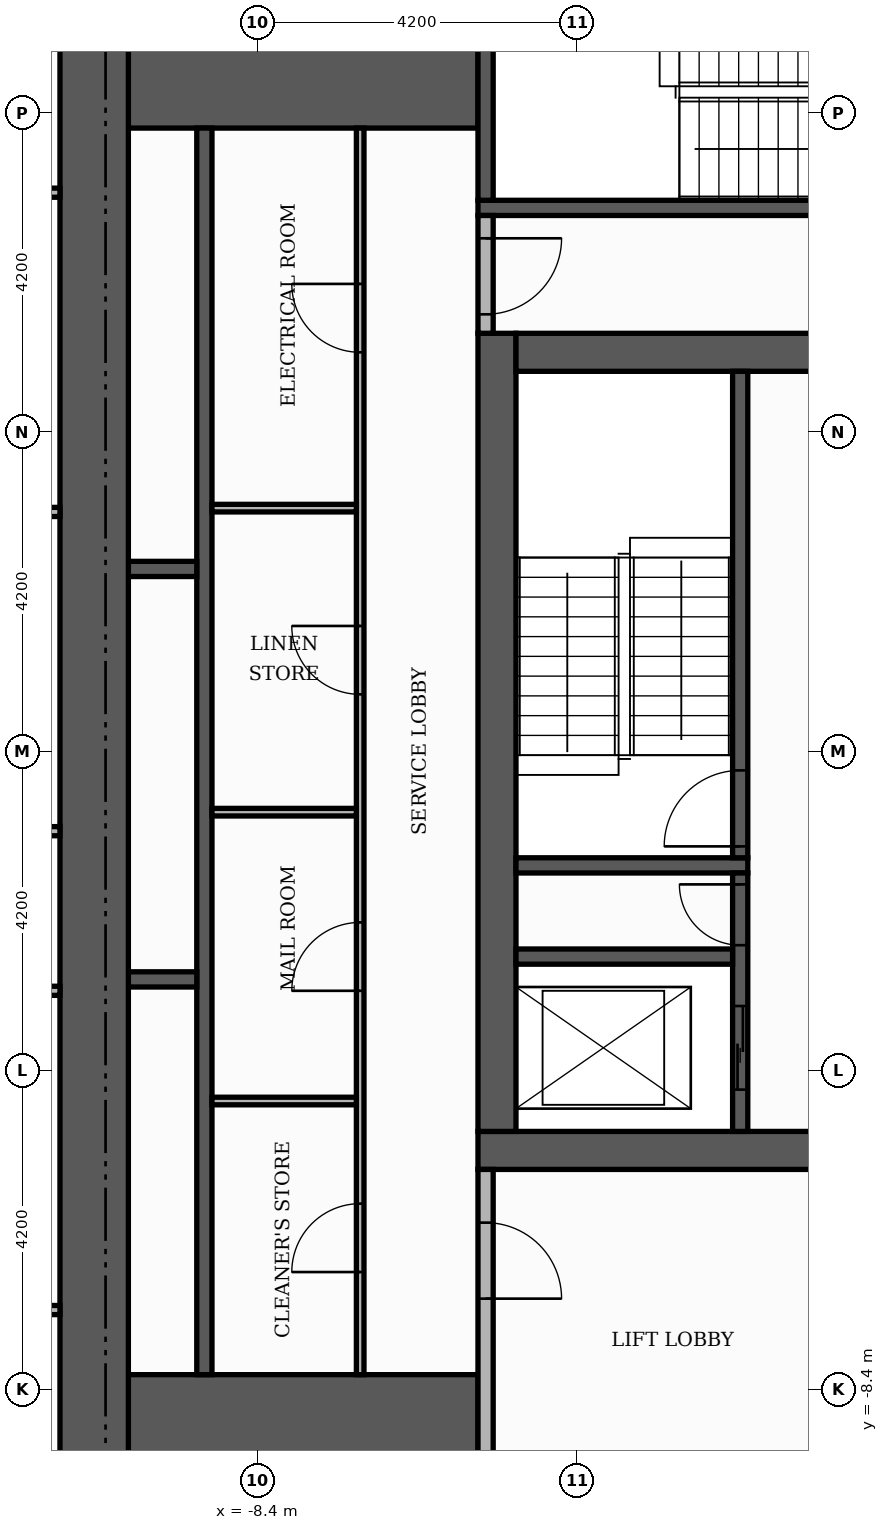
"""IFC4 building model, lengths in metres.
Left out: names, types, materials, properties, quantities, classifications, styles, units other than length and angle.
Written with IfcOpenShell. Run it as: python <this file> out.ifc"""

import sys

from ifc_helpers import new_model, si_unit, direction, frame, frame_2d, origin, place, context, subcontext, project, spatial, rectangle, extrude, element, fill, save


model = new_model("IFC4")
c1 = context("Model", 3, precision=1e-05, world=origin(), true_north=direction((0.0, 1.0)))
c2 = subcontext(c1, "Body", "Model", "MODEL_VIEW")
j1 = project(units=[si_unit("LENGTHUNIT", "METRE"), si_unit("PLANEANGLEUNIT", "RADIAN")], contexts=[c1])
p1 = place(None, origin())
s1 = spatial("IfcSite", under=j1, at=p1, CompositionType="ELEMENT")
p2 = place(p1, origin())
s2 = spatial("IfcBuilding", under=s1, at=p2, CompositionType="ELEMENT")
p3 = place(p2, frame((0.0, 0.0, 157.2)))
s3 = spatial("IfcBuildingStorey", under=s2, at=p3, CompositionType="ELEMENT", Elevation=157.2)
p4 = place(p3, frame((-5.5, -5.25, 0.0), z_axis=(0.0, 0.0, 1.0), x_axis=(1.0, 0.0, 0.0)))
e1 = element("IfcWall", 1, at=p4, inside=s3, PredefinedType="SHEAR", context=c2, shape_type="SweptSolid", body=[
    extrude(rectangle(XDim=11.0, YDim=0.5, at=frame_2d((5.5, 0.0))), origin(), (0.0, 0.0, 1.0), 3.48),
])
p5 = place(p4, frame((4.9, 0.0, 0.0)))
e2 = element("IfcOpeningElement", 2, at=p5, cuts=e1, PredefinedType="OPENING", context=c2, shape_type="SweptSolid", body=[
    extrude(rectangle(XDim=1.2, YDim=2.1, at=frame_2d((0.6, 1.05))), frame((0.0, 0.26, 0.0), z_axis=(0.0, -1.0, 0.0), x_axis=(1.0, 0.0, 0.0)), (0.0, 0.0, 1.0), 0.52),
])
p6 = place(p3, frame((-5.25, -5.0, 0.0), z_axis=(0.0, 0.0, 1.0), x_axis=(0.0, 1.0, 0.0)))
e3 = element("IfcWall", 3, at=p6, inside=s3, PredefinedType="SHEAR", context=c2, shape_type="SweptSolid", body=[
    extrude(rectangle(XDim=10.5, YDim=0.5, at=frame_2d((5.25, 0.0))), origin(), (0.0, 0.0, 1.0), 3.48),
])
p7 = place(p3, frame((-5.0, 5.25, 0.0), z_axis=(0.0, 0.0, 1.0), x_axis=(1.0, 0.0, 0.0)))
e4 = element("IfcWall", 4, at=p7, inside=s3, PredefinedType="SHEAR", context=c2, shape_type="SweptSolid", body=[
    extrude(rectangle(XDim=10.0, YDim=0.5, at=frame_2d((5.0, 0.0))), origin(), (0.0, 0.0, 1.0), 3.48),
])
p8 = place(p7, frame((4.4, 0.0, 0.0)))
e5 = element("IfcOpeningElement", 5, at=p8, cuts=e4, PredefinedType="OPENING", context=c2, shape_type="SweptSolid", body=[
    extrude(rectangle(XDim=1.2, YDim=2.1, at=frame_2d((0.6, 1.05))), frame((0.0, 0.26, 0.0), z_axis=(0.0, -1.0, 0.0), x_axis=(1.0, 0.0, 0.0)), (0.0, 0.0, 1.0), 0.52),
])
for number, where, z_axis, x_axis in (
    (6, (-10.1, -9.15, 0.0), (0.0, 0.0, 1.0), (1.0, 0.0, 0.0)),
    (7, (-10.1, 9.15, 0.0), (0.0, 0.0, 1.0), (1.0, 0.0, 0.0)),
):
    element("IfcWall", number, at=place(p3, frame(where, z_axis=z_axis, x_axis=x_axis)), inside=s3, PredefinedType="SHEAR", context=c2, shape_type="SweptSolid", body=[
        extrude(rectangle(XDim=4.6, YDim=1.9, at=frame_2d((2.3, 0.0))), origin(), (0.0, 0.0, 1.0), 3.48),
    ])
p9 = place(p3, frame((-5.0, -1.5, 0.0), z_axis=(0.0, 0.0, 1.0), x_axis=(1.0, 0.0, 0.0)))
e8 = element("IfcWall", 8, at=p9, inside=s3, PredefinedType="SHEAR", context=c2, shape_type="SweptSolid", body=[
    extrude(rectangle(XDim=3.05, YDim=0.2, at=frame_2d((1.525, 0.0))), origin(), (0.0, 0.0, 1.0), 3.48),
])
p10 = place(p3, frame((-2.05, -1.4, 0.0), z_axis=(0.0, 0.0, 1.0), x_axis=(0.0, 1.0, 0.0)))
e9 = element("IfcWall", 9, at=p10, inside=s3, PredefinedType="SHEAR", context=c2, shape_type="SweptSolid", body=[
    extrude(rectangle(XDim=6.4, YDim=0.2, at=frame_2d((3.2, 0.0))), origin(), (0.0, 0.0, 1.0), 3.48),
])
p11 = place(p10, frame((0.15, 0.0, 0.0)))
e10 = element("IfcOpeningElement", 10, at=p11, cuts=e9, PredefinedType="OPENING", context=c2, shape_type="SweptSolid", body=[
    extrude(rectangle(XDim=1.0, YDim=2.1, at=frame_2d((0.5, 1.05))), frame((0.0, 0.11, 0.0), z_axis=(0.0, -1.0, 0.0), x_axis=(1.0, 0.0, 0.0)), (0.0, 0.0, 1.0), 0.22),
])
p12 = place(p3, frame((-5.5, 7.15, 0.0), z_axis=(0.0, 0.0, 1.0), x_axis=(1.0, 0.0, 0.0)))
e11 = element("IfcWall", 11, at=p12, inside=s3, PredefinedType="SHEAR", context=c2, shape_type="SweptSolid", body=[
    extrude(rectangle(XDim=6.8, YDim=0.2, at=frame_2d((3.4, 0.0))), origin(), (0.0, 0.0, 1.0), 3.48),
])
p13 = place(p3, frame((-5.4, 7.25, 0.0), z_axis=(0.0, 0.0, 1.0), x_axis=(0.0, 1.0, 0.0)))
e12 = element("IfcWall", 12, at=p13, inside=s3, PredefinedType="SHEAR", context=c2, shape_type="SweptSolid", body=[
    extrude(rectangle(XDim=2.85, YDim=0.2, at=frame_2d((1.425, 0.0))), origin(), (0.0, 0.0, 1.0), 3.48),
])
p14 = place(p3, frame((-9.1, -8.2, 0.0), z_axis=(0.0, 0.0, 1.0), x_axis=(0.0, 1.0, 0.0)))
e13 = element("IfcWall", 13, at=p14, inside=s3, PredefinedType="SHEAR", context=c2, shape_type="SweptSolid", body=[
    extrude(rectangle(XDim=16.4, YDim=0.2, at=frame_2d((8.2, 0.0))), origin(), (0.0, 0.0, 1.0), 3.48),
])
p15 = place(p3, frame((-2.05, -5.0, 0.0), z_axis=(0.0, 0.0, 1.0), x_axis=(0.0, 1.0, 0.0)))
e14 = element("IfcWall", 14, at=p15, inside=s3, PredefinedType="SHEAR", context=c2, shape_type="SweptSolid", body=[
    extrude(rectangle(XDim=3.4, YDim=0.2, at=frame_2d((1.7, 0.0))), origin(), (0.0, 0.0, 1.0), 3.48),
])
p16 = place(p15, frame((0.55, 0.0, 0.0)))
e15 = element("IfcOpeningElement", 15, at=p16, cuts=e14, PredefinedType="OPENING", context=c2, shape_type="SweptSolid", body=[
    extrude(rectangle(XDim=1.1, YDim=2.1, at=frame_2d((0.55, 1.05))), frame((0.0, 0.11, 0.0), z_axis=(0.0, -1.0, 0.0), x_axis=(1.0, 0.0, 0.0)), (0.0, 0.0, 1.0), 0.22),
])
p17 = place(p15, frame((2.45, 0.0, 0.0)))
e16 = element("IfcOpeningElement", 16, at=p17, cuts=e14, PredefinedType="OPENING", context=c2, shape_type="SweptSolid", body=[
    extrude(rectangle(XDim=0.8, YDim=2.1, at=frame_2d((0.4, 1.05))), frame((0.0, 0.11, 0.0), z_axis=(0.0, -1.0, 0.0), x_axis=(1.0, 0.0, 0.0)), (0.0, 0.0, 1.0), 0.22),
])
p18 = place(p3, frame((-10.1, -3.0, 0.0), z_axis=(0.0, 0.0, 1.0), x_axis=(1.0, 0.0, 0.0)))
e17 = element("IfcWall", 17, at=p18, inside=s3, PredefinedType="SHEAR", context=c2, shape_type="SweptSolid", body=[
    extrude(rectangle(XDim=0.9, YDim=0.2, at=frame_2d((0.45, 0.0))), origin(), (0.0, 0.0, 1.0), 3.48),
])
p19 = place(p3, frame((-5.0, -2.7, 0.0), z_axis=(0.0, 0.0, 1.0), x_axis=(1.0, 0.0, 0.0)))
e18 = element("IfcWall", 18, at=p19, inside=s3, PredefinedType="SHEAR", context=c2, shape_type="SweptSolid", body=[
    extrude(rectangle(XDim=2.85, YDim=0.2, at=frame_2d((1.425, 0.0))), origin(), (0.0, 0.0, 1.0), 3.48),
])
p20 = place(p3, frame((-10.1, 2.4, 0.0), z_axis=(0.0, 0.0, 1.0), x_axis=(1.0, 0.0, 0.0)))
e19 = element("IfcWall", 19, at=p20, inside=s3, PredefinedType="SHEAR", context=c2, shape_type="SweptSolid", body=[
    extrude(rectangle(XDim=0.9, YDim=0.2, at=frame_2d((0.45, 0.0))), origin(), (0.0, 0.0, 1.0), 3.48),
])
p21 = place(p3, frame((-10.55, -10.1, 0.0), z_axis=(0.0, 0.0, 1.0), x_axis=(0.0, 1.0, 0.0)))
e20 = element("IfcWall", 20, at=p21, inside=s3, PredefinedType="SHEAR", context=c2, shape_type="SweptSolid", body=[
    extrude(rectangle(XDim=20.2, YDim=0.9, at=frame_2d((10.1, 0.0))), origin(), (0.0, 0.0, 1.0), 3.48),
])
p22 = place(p3, frame((-5.4, -10.1, 0.0), z_axis=(0.0, 0.0, 1.0), x_axis=(0.0, 1.0, 0.0)))
e21 = element("IfcWall", 21, at=p22, inside=s3, PredefinedType="PARTITIONING", context=c2, shape_type="SweptSolid", body=[
    extrude(rectangle(XDim=4.6, YDim=0.2, at=frame_2d((2.3, 0.0))), origin(), (0.0, 0.0, 1.0), 3.48),
])
p23 = place(p22, frame((2.9, 0.0, 0.0)))
e22 = element("IfcOpeningElement", 22, at=p23, cuts=e21, PredefinedType="OPENING", context=c2, shape_type="SweptSolid", body=[
    extrude(rectangle(XDim=1.0, YDim=2.1, at=frame_2d((0.5, 1.05))), frame((0.0, 0.11, 0.0), z_axis=(0.0, -1.0, 0.0), x_axis=(1.0, 0.0, 0.0)), (0.0, 0.0, 1.0), 0.22),
])
p24 = place(p3, frame((-7.05, -8.2, 0.0), z_axis=(0.0, 0.0, 1.0), x_axis=(0.0, 1.0, 0.0)))
e23 = element("IfcWall", 23, at=p24, inside=s3, PredefinedType="PARTITIONING", context=c2, shape_type="SweptSolid", body=[
    extrude(rectangle(XDim=16.4, YDim=0.1, at=frame_2d((8.2, 0.0))), origin(), (0.0, 0.0, 1.0), 3.48),
])
p25 = place(p24, frame((1.35, 0.0, 0.0)))
e24 = element("IfcOpeningElement", 24, at=p25, cuts=e23, PredefinedType="OPENING", context=c2, shape_type="SweptSolid", body=[
    extrude(rectangle(XDim=0.9, YDim=2.1, at=frame_2d((0.45, 1.05))), frame((0.0, 0.06, 0.0), z_axis=(0.0, -1.0, 0.0), x_axis=(1.0, 0.0, 0.0)), (0.0, 0.0, 1.0), 0.12),
])
p26 = place(p24, frame((5.05, 0.0, 0.0)))
e25 = element("IfcOpeningElement", 25, at=p26, cuts=e23, PredefinedType="OPENING", context=c2, shape_type="SweptSolid", body=[
    extrude(rectangle(XDim=0.9, YDim=2.1, at=frame_2d((0.45, 1.05))), frame((0.0, 0.06, 0.0), z_axis=(0.0, -1.0, 0.0), x_axis=(1.0, 0.0, 0.0)), (0.0, 0.0, 1.0), 0.12),
])
p27 = place(p24, frame((8.95, 0.0, 0.0)))
e26 = element("IfcOpeningElement", 26, at=p27, cuts=e23, PredefinedType="OPENING", context=c2, shape_type="SweptSolid", body=[
    extrude(rectangle(XDim=0.9, YDim=2.1, at=frame_2d((0.45, 1.05))), frame((0.0, 0.06, 0.0), z_axis=(0.0, -1.0, 0.0), x_axis=(1.0, 0.0, 0.0)), (0.0, 0.0, 1.0), 0.12),
])
p28 = place(p24, frame((13.45, 0.0, 0.0)))
e27 = element("IfcOpeningElement", 27, at=p28, cuts=e23, PredefinedType="OPENING", context=c2, shape_type="SweptSolid", body=[
    extrude(rectangle(XDim=0.9, YDim=2.1, at=frame_2d((0.45, 1.05))), frame((0.0, 0.06, 0.0), z_axis=(0.0, -1.0, 0.0), x_axis=(1.0, 0.0, 0.0)), (0.0, 0.0, 1.0), 0.12),
])
for number, where, z_axis, x_axis in (
    (28, (-9.0, -4.6, 0.0), (0.0, 0.0, 1.0), (1.0, 0.0, 0.0)),
    (29, (-9.0, -0.8, 0.0), (0.0, 0.0, 1.0), (1.0, 0.0, 0.0)),
    (30, (-9.0, 3.2, 0.0), (0.0, 0.0, 1.0), (1.0, 0.0, 0.0)),
):
    element("IfcWall", number, at=place(p3, frame(where, z_axis=z_axis, x_axis=x_axis)), inside=s3, PredefinedType="PARTITIONING", context=c2, shape_type="SweptSolid", body=[
        extrude(rectangle(XDim=1.9, YDim=0.1, at=frame_2d((0.95, 0.0))), origin(), (0.0, 0.0, 1.0), 3.48),
    ])
p29 = place(p3, frame((-5.4, 5.5, 0.0), z_axis=(0.0, 0.0, 1.0), x_axis=(0.0, 1.0, 0.0)))
e31 = element("IfcWall", 31, at=p29, inside=s3, PredefinedType="PARTITIONING", context=c2, shape_type="SweptSolid", body=[
    extrude(rectangle(XDim=1.55, YDim=0.2, at=frame_2d((0.775, 0.0))), origin(), (0.0, 0.0, 1.0), 3.48),
])
p30 = place(p29, frame((0.25, 0.0, 0.0)))
e32 = element("IfcOpeningElement", 32, at=p30, cuts=e31, PredefinedType="OPENING", context=c2, shape_type="SweptSolid", body=[
    extrude(rectangle(XDim=1.0, YDim=2.1, at=frame_2d((0.5, 1.05))), frame((0.0, 0.11, 0.0), z_axis=(0.0, -1.0, 0.0), x_axis=(1.0, 0.0, 0.0)), (0.0, 0.0, 1.0), 0.22),
])
for number, where, z_axis, x_axis in (
    (33, (-18.32, -7.35, 0.0), (0.0, 0.0, 1.0), (1.0, 0.0, 0.0)),
    (34, (-18.32, -3.15, 0.0), (0.0, 0.0, 1.0), (1.0, 0.0, 0.0)),
    (35, (-18.32, -1.05, 0.0), (0.0, 0.0, 1.0), (1.0, 0.0, 0.0)),
    (36, (-18.32, 3.15, 0.0), (0.0, 0.0, 1.0), (1.0, 0.0, 0.0)),
):
    element("IfcWall", number, at=place(p3, frame(where, z_axis=z_axis, x_axis=x_axis)), inside=s3, PredefinedType="PARTITIONING", context=c2, shape_type="SweptSolid", body=[
        extrude(rectangle(XDim=7.32, YDim=0.12, at=frame_2d((3.66, 0.0))), origin(), (0.0, 0.0, 1.0), 3.48),
    ])
p31 = place(p3, frame((-18.32, 7.35, 0.0), z_axis=(0.0, 0.0, 1.0), x_axis=(1.0, 0.0, 0.0)))
e37 = element("IfcWall", 37, at=p31, inside=s3, PredefinedType="PARTITIONING", context=c2, shape_type="SweptSolid", body=[
    extrude(rectangle(XDim=7.32, YDim=0.12, at=frame_2d((3.66, 0.0))), origin(), (0.0, 0.0, 1.0), 3.48),
])
p32 = place(p31, frame((3.21, 0.0, 0.0)))
e38 = element("IfcOpeningElement", 38, at=p32, cuts=e37, PredefinedType="OPENING", context=c2, shape_type="SweptSolid", body=[
    extrude(rectangle(XDim=0.9, YDim=2.1, at=frame_2d((0.45, 1.05))), frame((0.0, 0.07, 0.0), z_axis=(0.0, -1.0, 0.0), x_axis=(1.0, 0.0, 0.0)), (0.0, 0.0, 1.0), 0.14),
])
p33 = place(p16, origin())
e39 = element("IfcDoor", 39, at=p33, inside=s3, OperationType="SLIDING_TO_LEFT", PredefinedType="DOOR", context=c2, shape_type="SweptSolid", body=[
    extrude(rectangle(XDim=1.1, YDim=2.1, at=frame_2d((0.55, 1.05))), frame((0.0, 0.025, 0.0), z_axis=(0.0, -1.0, 0.0), x_axis=(1.0, 0.0, 0.0)), (0.0, 0.0, 1.0), 0.05),
])
fill(e15, e39)
p34 = place(p11, origin())
e40 = element("IfcDoor", 40, at=p34, inside=s3, OperationType="SINGLE_SWING_LEFT", PredefinedType="DOOR", context=c2, shape_type="SweptSolid", body=[
    extrude(rectangle(XDim=1.0, YDim=2.1, at=frame_2d((0.5, 1.05))), frame((0.0, 0.025, 0.0), z_axis=(0.0, -1.0, 0.0), x_axis=(1.0, 0.0, 0.0)), (0.0, 0.0, 1.0), 0.05),
])
fill(e10, e40)
p35 = place(p17, origin())
e41 = element("IfcDoor", 41, at=p35, inside=s3, OperationType="SINGLE_SWING_RIGHT", PredefinedType="DOOR", context=c2, shape_type="SweptSolid", body=[
    extrude(rectangle(XDim=0.8, YDim=2.1, at=frame_2d((0.4, 1.05))), frame((0.0, 0.025, 0.0), z_axis=(0.0, -1.0, 0.0), x_axis=(1.0, 0.0, 0.0)), (0.0, 0.0, 1.0), 0.05),
])
fill(e16, e41)
p36 = place(p30, frame((1.0, 0.0, 0.0), z_axis=(0.0, 0.0, 1.0), x_axis=(-1.0, 0.0, 0.0)))
e42 = element("IfcDoor", 42, at=p36, inside=s3, OperationType="SINGLE_SWING_RIGHT", PredefinedType="DOOR", context=c2, shape_type="SweptSolid", body=[
    extrude(rectangle(XDim=1.0, YDim=2.1, at=frame_2d((0.5, 1.05))), frame((0.0, 0.025, 0.0), z_axis=(0.0, -1.0, 0.0), x_axis=(1.0, 0.0, 0.0)), (0.0, 0.0, 1.0), 0.05),
])
fill(e32, e42)
p37 = place(p23, frame((1.0, 0.0, 0.0), z_axis=(0.0, 0.0, 1.0), x_axis=(-1.0, 0.0, 0.0)))
e43 = element("IfcDoor", 43, at=p37, inside=s3, OperationType="SINGLE_SWING_LEFT", PredefinedType="DOOR", context=c2, shape_type="SweptSolid", body=[
    extrude(rectangle(XDim=1.0, YDim=2.1, at=frame_2d((0.5, 1.05))), frame((0.0, 0.025, 0.0), z_axis=(0.0, -1.0, 0.0), x_axis=(1.0, 0.0, 0.0)), (0.0, 0.0, 1.0), 0.05),
])
fill(e22, e43)
p38 = place(p25, origin())
e44 = element("IfcDoor", 44, at=p38, inside=s3, OperationType="SINGLE_SWING_LEFT", PredefinedType="DOOR", context=c2, shape_type="SweptSolid", body=[
    extrude(rectangle(XDim=0.9, YDim=2.1, at=frame_2d((0.45, 1.05))), frame((0.0, 0.025, 0.0), z_axis=(0.0, -1.0, 0.0), x_axis=(1.0, 0.0, 0.0)), (0.0, 0.0, 1.0), 0.05),
])
fill(e24, e44)
p39 = place(p26, origin())
e45 = element("IfcDoor", 45, at=p39, inside=s3, OperationType="SINGLE_SWING_LEFT", PredefinedType="DOOR", context=c2, shape_type="SweptSolid", body=[
    extrude(rectangle(XDim=0.9, YDim=2.1, at=frame_2d((0.45, 1.05))), frame((0.0, 0.025, 0.0), z_axis=(0.0, -1.0, 0.0), x_axis=(1.0, 0.0, 0.0)), (0.0, 0.0, 1.0), 0.05),
])
fill(e25, e45)
p40 = place(p27, origin())
e46 = element("IfcDoor", 46, at=p40, inside=s3, OperationType="SINGLE_SWING_RIGHT", PredefinedType="DOOR", context=c2, shape_type="SweptSolid", body=[
    extrude(rectangle(XDim=0.9, YDim=2.1, at=frame_2d((0.45, 1.05))), frame((0.0, 0.025, 0.0), z_axis=(0.0, -1.0, 0.0), x_axis=(1.0, 0.0, 0.0)), (0.0, 0.0, 1.0), 0.05),
])
fill(e26, e46)
p41 = place(p28, origin())
e47 = element("IfcDoor", 47, at=p41, inside=s3, OperationType="SINGLE_SWING_RIGHT", PredefinedType="DOOR", context=c2, shape_type="SweptSolid", body=[
    extrude(rectangle(XDim=0.9, YDim=2.1, at=frame_2d((0.45, 1.05))), frame((0.0, 0.025, 0.0), z_axis=(0.0, -1.0, 0.0), x_axis=(1.0, 0.0, 0.0)), (0.0, 0.0, 1.0), 0.05),
])
fill(e27, e47)
save(model, sys.argv[1])
